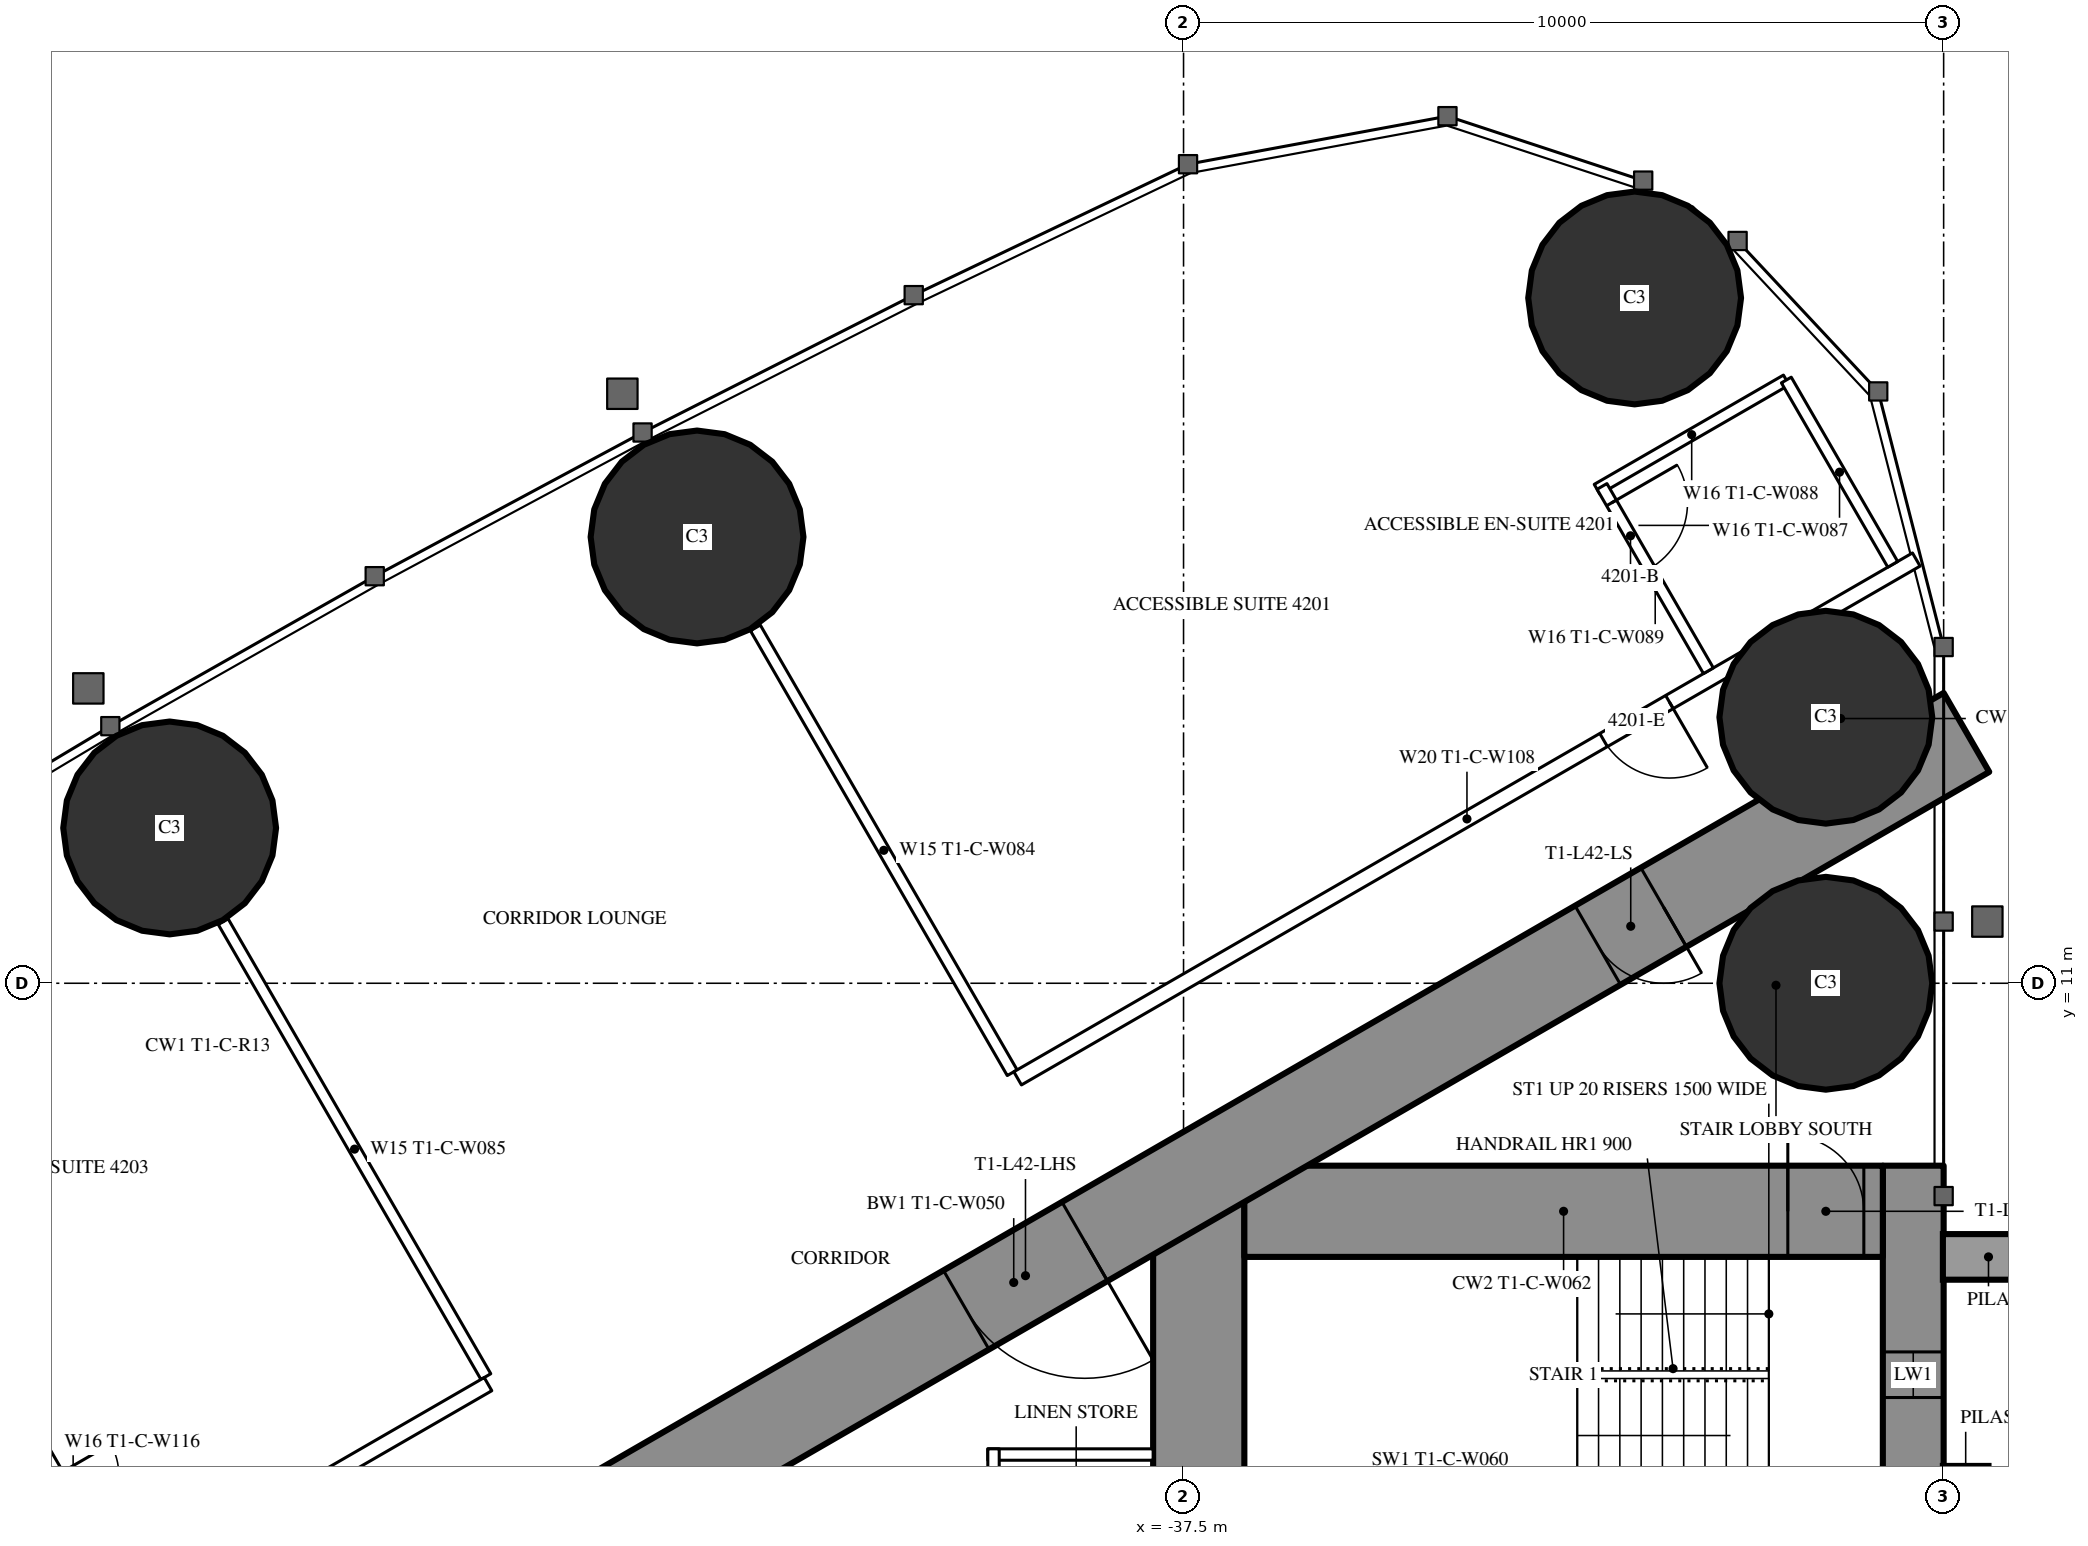
"""IFC4 building model, lengths in metres.
Left out: names, types, materials, properties, quantities, classifications, styles, units other than length and angle.
Written with IfcOpenShell. Run it as: python <this file> out.ifc"""

import sys

from ifc_helpers import new_model, si_unit, direction, frame, frame_2d, origin, origin_2d, place, context, subcontext, project, spatial, rectangle, circle, extrude, element, fill, save


model = new_model("IFC4")
c1 = context("Model", 3, precision=1e-05, world=origin(), true_north=direction((0.0, 1.0)))
c2 = subcontext(c1, "Body", "Model", "MODEL_VIEW")
j1 = project(units=[si_unit("LENGTHUNIT", "METRE"), si_unit("PLANEANGLEUNIT", "RADIAN")], contexts=[c1])
p1 = place(None, origin())
s1 = spatial("IfcSite", under=j1, at=p1, CompositionType="ELEMENT")
p2 = place(p1, origin())
s2 = spatial("IfcBuilding", under=s1, at=p2, CompositionType="ELEMENT")
p3 = place(p2, frame((0.0, 0.0, 159.8)))
s3 = spatial("IfcBuildingStorey", under=s2, at=p3, CompositionType="ELEMENT", Elevation=159.8)
for number, where, z_axis, x_axis in (
    (1, (-31.565, 20.016, 0.0), (0.0, 0.0, 1.0), (1.0, 0.0, 0.0)),
    (2, (-29.05, 11.0, 0.0), (0.0, 0.0, 1.0), (1.0, 0.0, 0.0)),
    (3, (-29.05, 14.5, 0.0), (0.0, 0.0, 1.0), (1.0, 0.0, 0.0)),
    (4, (-43.9, 16.871, 0.0), (0.0, 0.0, 1.0), (1.0, 0.0, 0.0)),
    (5, (-50.839, 13.043, 0.0), (0.0, 0.0, 1.0), (1.0, 0.0, 0.0)),
):
    element("IfcColumn", number, at=place(p3, frame(where, z_axis=z_axis, x_axis=x_axis)), inside=s3, PredefinedType="COLUMN", context=c2, shape_type="SweptSolid", body=[
        extrude(circle(Radius=1.4, at=origin_2d()), origin(), (0.0, 0.0, 1.0), 3.5),
    ])
p4 = place(p3, frame((-27.9, 8.6, 0.0), z_axis=(0.0, 0.0, 1.0), x_axis=(0.0, -1.0, 0.0)))
e6 = element("IfcWall", 6, at=p4, inside=s3, PredefinedType="SHEAR", context=c2, shape_type="SweptSolid", body=[
    extrude(rectangle(XDim=17.2, YDim=0.8, at=frame_2d((8.6, 0.0))), origin(), (0.0, 0.0, 1.0), 3.5),
])
p5 = place(p4, frame((2.45, 0.0, 0.6)))
e7 = element("IfcOpeningElement", 7, at=p5, cuts=e6, PredefinedType="OPENING", context=c2, shape_type="SweptSolid", body=[
    extrude(rectangle(XDim=0.6, YDim=2.1, at=frame_2d((0.3, 1.05))), frame((0.0, 0.41, 0.0), z_axis=(0.0, -1.0, 0.0), x_axis=(1.0, 0.0, 0.0)), (0.0, 0.0, 1.0), 0.82),
])
p6 = place(p4, frame((14.15, 0.0, 0.6)))
e8 = element("IfcOpeningElement", 8, at=p6, cuts=e6, PredefinedType="OPENING", context=c2, shape_type="SweptSolid", body=[
    extrude(rectangle(XDim=0.6, YDim=2.1, at=frame_2d((0.3, 1.05))), frame((0.0, 0.41, 0.0), z_axis=(0.0, -1.0, 0.0), x_axis=(1.0, 0.0, 0.0)), (0.0, 0.0, 1.0), 0.82),
])
p7 = place(p3, frame((-37.3, 8.6, 0.0), z_axis=(0.0, 0.0, 1.0), x_axis=(0.0, -1.0, 0.0)))
e9 = element("IfcWall", 9, at=p7, inside=s3, PredefinedType="SHEAR", context=c2, shape_type="SweptSolid", body=[
    extrude(rectangle(XDim=17.2, YDim=1.2, at=frame_2d((8.6, 0.0))), origin(), (0.0, 0.0, 1.0), 3.5),
])
p8 = place(p7, frame((7.7, 0.0, 0.0)))
e10 = element("IfcOpeningElement", 10, at=p8, cuts=e9, PredefinedType="OPENING", context=c2, shape_type="SweptSolid", body=[
    extrude(rectangle(XDim=1.8, YDim=2.2, at=frame_2d((0.9, 1.1))), frame((0.0, 0.61, 0.0), z_axis=(0.0, -1.0, 0.0), x_axis=(1.0, 0.0, 0.0)), (0.0, 0.0, 1.0), 1.22),
])
p9 = place(p3, frame((-28.3, 8.0, 0.0), z_axis=(0.0, 0.0, 1.0), x_axis=(-1.0, 0.0, 0.0)))
e11 = element("IfcWall", 11, at=p9, inside=s3, PredefinedType="SHEAR", context=c2, shape_type="SweptSolid", body=[
    extrude(rectangle(XDim=8.4, YDim=1.2, at=frame_2d((4.2, 0.0))), origin(), (0.0, 0.0, 1.0), 3.5),
])
p10 = place(p9, frame((0.25, 0.0, 0.0)))
e12 = element("IfcOpeningElement", 12, at=p10, cuts=e11, PredefinedType="OPENING", context=c2, shape_type="SweptSolid", body=[
    extrude(rectangle(XDim=1.0, YDim=2.2, at=frame_2d((0.5, 1.1))), frame((0.0, 0.61, 0.0), z_axis=(0.0, -1.0, 0.0), x_axis=(1.0, 0.0, 0.0)), (0.0, 0.0, 1.0), 1.22),
])
p11 = place(p3, frame((-27.2, 14.3, 0.0), z_axis=(0.0, 0.0, 1.0), x_axis=(-0.866026593062, -0.499997940104, 0.0)))
e13 = element("IfcWall", 13, at=p11, inside=s3, PredefinedType="SHEAR", context=c2, shape_type="SweptSolid", body=[
    extrude(rectangle(XDim=28.946, YDim=1.2, at=frame_2d((14.473, 0.0))), origin(), (0.0, 0.0, 1.0), 3.5),
])
p12 = place(p11, frame((4.6, 0.0, 0.0)))
e14 = element("IfcOpeningElement", 14, at=p12, cuts=e13, PredefinedType="OPENING", context=c2, shape_type="SweptSolid", body=[
    extrude(rectangle(XDim=1.0, YDim=2.2, at=frame_2d((0.5, 1.1))), frame((0.0, 0.61, 0.0), z_axis=(0.0, -1.0, 0.0), x_axis=(1.0, 0.0, 0.0)), (0.0, 0.0, 1.0), 1.22),
])
p13 = place(p11, frame((13.395, 0.0, 0.0)))
e15 = element("IfcOpeningElement", 15, at=p13, cuts=e13, PredefinedType="OPENING", context=c2, shape_type="SweptSolid", body=[
    extrude(rectangle(XDim=1.8, YDim=2.2, at=frame_2d((0.9, 1.1))), frame((0.0, 0.61, 0.0), z_axis=(0.0, -1.0, 0.0), x_axis=(1.0, 0.0, 0.0)), (0.0, 0.0, 1.0), 1.22),
])
p14 = place(p3, frame((-39.754, 9.823, 0.0), z_axis=(0.0, 0.0, 1.0), x_axis=(-0.499997670926, 0.866026748472, 0.0)))
e16 = element("IfcWall", 16, at=p14, inside=s3, PredefinedType="PARTITIONING", context=c2, shape_type="SweptSolid", body=[
    extrude(rectangle(XDim=6.757, YDim=0.15, at=frame_2d((3.379, 0.0))), origin(), (0.0, 0.0, 1.0), 2.3),
])
p15 = place(p3, frame((-46.679, 5.825, 0.0), z_axis=(0.0, 0.0, 1.0), x_axis=(-0.500006839597, 0.866021454905, 0.0)))
e17 = element("IfcWall", 17, at=p15, inside=s3, PredefinedType="PARTITIONING", context=c2, shape_type="SweptSolid", body=[
    extrude(rectangle(XDim=6.911, YDim=0.15, at=frame_2d((3.456, 0.0))), origin(), (0.0, 0.0, 1.0), 2.3),
])
p16 = place(p3, frame((-27.86, 16.575, 0.0), z_axis=(0.0, 0.0, 1.0), x_axis=(-0.866026850238, -0.499997494661, 0.0)))
e18 = element("IfcWall", 18, at=p16, inside=s3, PredefinedType="PARTITIONING", context=c2, shape_type="SweptSolid", body=[
    extrude(rectangle(XDim=13.651, YDim=0.2, at=frame_2d((6.826, 0.0))), origin(), (0.0, 0.0, 1.0), 3.25),
])
p17 = place(p16, frame((3.75, 0.0, 0.0)))
e19 = element("IfcOpeningElement", 19, at=p17, cuts=e18, PredefinedType="OPENING", context=c2, shape_type="SweptSolid", body=[
    extrude(rectangle(XDim=1.0, YDim=2.2, at=frame_2d((0.5, 1.1))), frame((0.0, 0.11, 0.0), z_axis=(0.0, -1.0, 0.0), x_axis=(1.0, 0.0, 0.0)), (0.0, 0.0, 1.0), 0.22),
])
p18 = place(p3, frame((-46.65, 5.726, 0.0), z_axis=(0.0, 0.0, 1.0), x_axis=(-0.866027963864, -0.499995565786, 0.0)))
e20 = element("IfcWall", 20, at=p18, inside=s3, PredefinedType="PARTITIONING", context=c2, shape_type="SweptSolid", body=[
    extrude(rectangle(XDim=11.452, YDim=0.2, at=frame_2d((5.726, 0.0))), origin(), (0.0, 0.0, 1.0), 3.25),
])
p19 = place(p18, frame((4.294, 0.0, 0.0)))
e21 = element("IfcOpeningElement", 21, at=p19, cuts=e20, PredefinedType="OPENING", context=c2, shape_type="SweptSolid", body=[
    extrude(rectangle(XDim=0.95, YDim=2.2, at=frame_2d((0.475, 1.1))), frame((0.0, 0.11, 0.0), z_axis=(0.0, -1.0, 0.0), x_axis=(1.0, 0.0, 0.0)), (0.0, 0.0, 1.0), 0.22),
])
p20 = place(p18, frame((8.344, 0.0, 0.0)))
e22 = element("IfcOpeningElement", 22, at=p20, cuts=e20, PredefinedType="OPENING", context=c2, shape_type="SweptSolid", body=[
    extrude(rectangle(XDim=0.95, YDim=2.2, at=frame_2d((0.475, 1.1))), frame((0.0, 0.11, 0.0), z_axis=(0.0, -1.0, 0.0), x_axis=(1.0, 0.0, 0.0)), (0.0, 0.0, 1.0), 0.22),
])
p21 = place(p3, frame((-29.57, 18.936, 0.0), z_axis=(0.0, 0.0, 1.0), x_axis=(-0.866018712932, -0.500011588718, 0.0)))
e23 = element("IfcWall", 23, at=p21, inside=s3, PredefinedType="PARTITIONING", context=c2, shape_type="SweptSolid", body=[
    extrude(rectangle(XDim=2.875, YDim=0.15, at=frame_2d((1.438, 0.0))), origin(), (0.0, 0.0, 1.0), 3.25),
])
p22 = place(p3, frame((-30.595, 15.111, 0.0), z_axis=(0.0, 0.0, 1.0), x_axis=(-0.49998411664, 0.866034573852, 0.0)))
e24 = element("IfcWall", 24, at=p22, inside=s3, PredefinedType="PARTITIONING", context=c2, shape_type="SweptSolid", body=[
    extrude(rectangle(XDim=2.8, YDim=0.15, at=frame_2d((1.4, 0.0))), origin(), (0.0, 0.0, 1.0), 3.25),
])
p23 = place(p22, frame((1.55, 0.0, 0.0)))
e25 = element("IfcOpeningElement", 25, at=p23, cuts=e24, PredefinedType="OPENING", context=c2, shape_type="SweptSolid", body=[
    extrude(rectangle(XDim=1.0, YDim=2.2, at=frame_2d((0.5, 1.1))), frame((0.0, 0.085, 0.0), z_axis=(0.0, -1.0, 0.0), x_axis=(1.0, 0.0, 0.0)), (0.0, 0.0, 1.0), 0.17),
])
p24 = place(p3, frame((-28.17, 16.511, 0.0), z_axis=(0.0, 0.0, 1.0), x_axis=(-0.49994636267, 0.866056369097, 0.0)))
e26 = element("IfcWall", 26, at=p24, inside=s3, PredefinedType="PARTITIONING", context=c2, shape_type="SweptSolid", body=[
    extrude(rectangle(XDim=2.8, YDim=0.15, at=frame_2d((1.4, 0.0))), origin(), (0.0, 0.0, 1.0), 3.25),
])
p25 = place(p3, frame((-51.459, 3.065, 0.0), z_axis=(0.0, 0.0, 1.0), x_axis=(-0.499936506574, 0.866062058628, 0.0)))
e27 = element("IfcWall", 27, at=p25, inside=s3, PredefinedType="PARTITIONING", context=c2, shape_type="SweptSolid", body=[
    extrude(rectangle(XDim=2.6, YDim=0.15, at=frame_2d((1.3, 0.0))), origin(), (0.0, 0.0, 1.0), 3.25),
])
p26 = place(p25, frame((0.9, 0.0, 0.0)))
e28 = element("IfcOpeningElement", 28, at=p26, cuts=e27, PredefinedType="OPENING", context=c2, shape_type="SweptSolid", body=[
    extrude(rectangle(XDim=0.8, YDim=2.2, at=frame_2d((0.4, 1.1))), frame((0.0, 0.085, 0.0), z_axis=(0.0, -1.0, 0.0), x_axis=(1.0, 0.0, 0.0)), (0.0, 0.0, 1.0), 0.17),
])
p27 = place(p3, frame((-37.9, 4.8, 0.0), z_axis=(0.0, 0.0, 1.0), x_axis=(-1.0, 0.0, 0.0)))
e29 = element("IfcWall", 29, at=p27, inside=s3, PredefinedType="PARTITIONING", context=c2, shape_type="SweptSolid", body=[
    extrude(rectangle(XDim=2.175, YDim=0.15, at=frame_2d((1.087, 0.0))), origin(), (0.0, 0.0, 1.0), 3.25),
])
p28 = place(p3, frame((-40.0, 4.875, 0.0), z_axis=(0.0, 0.0, 1.0), x_axis=(0.0, -1.0, 0.0)))
e30 = element("IfcWall", 30, at=p28, inside=s3, PredefinedType="PARTITIONING", context=c2, shape_type="SweptSolid", body=[
    extrude(rectangle(XDim=1.95, YDim=0.15, at=frame_2d((0.975, 0.0))), origin(), (0.0, 0.0, 1.0), 3.25),
])
p29 = place(p28, frame((0.475, 0.0, 0.0)))
e31 = element("IfcOpeningElement", 31, at=p29, cuts=e30, PredefinedType="OPENING", context=c2, shape_type="SweptSolid", body=[
    extrude(rectangle(XDim=1.0, YDim=2.2, at=frame_2d((0.5, 1.1))), frame((0.0, 0.085, 0.0), z_axis=(0.0, -1.0, 0.0), x_axis=(1.0, 0.0, 0.0)), (0.0, 0.0, 1.0), 0.17),
])
p30 = place(p23, origin())
e32 = element("IfcDoor", 32, at=p30, inside=s3, OperationType="SINGLE_SWING_RIGHT", PredefinedType="DOOR", context=c2, shape_type="SweptSolid", body=[
    extrude(rectangle(XDim=1.0, YDim=2.2, at=frame_2d((0.5, 1.1))), frame((0.0, 0.025, 0.0), z_axis=(0.0, -1.0, 0.0), x_axis=(1.0, 0.0, 0.0)), (0.0, 0.0, 1.0), 0.05),
])
fill(e25, e32)
p31 = place(p17, origin())
e33 = element("IfcDoor", 33, at=p31, inside=s3, OperationType="SINGLE_SWING_LEFT", PredefinedType="DOOR", context=c2, shape_type="SweptSolid", body=[
    extrude(rectangle(XDim=1.0, YDim=2.2, at=frame_2d((0.5, 1.1))), frame((0.0, 0.025, 0.0), z_axis=(0.0, -1.0, 0.0), x_axis=(1.0, 0.0, 0.0)), (0.0, 0.0, 1.0), 0.05),
])
fill(e19, e33)
p32 = place(p12, origin())
e34 = element("IfcDoor", 34, at=p32, inside=s3, OperationType="SINGLE_SWING_LEFT", PredefinedType="DOOR", context=c2, shape_type="SweptSolid", body=[
    extrude(rectangle(XDim=1.0, YDim=2.2, at=frame_2d((0.5, 1.1))), frame((0.0, 0.025, 0.0), z_axis=(0.0, -1.0, 0.0), x_axis=(1.0, 0.0, 0.0)), (0.0, 0.0, 1.0), 0.05),
])
fill(e14, e34)
p33 = place(p13, origin())
e35 = element("IfcDoor", 35, at=p33, inside=s3, OperationType="DOUBLE_DOOR_SINGLE_SWING", PredefinedType="DOOR", context=c2, shape_type="SweptSolid", body=[
    extrude(rectangle(XDim=1.8, YDim=2.2, at=frame_2d((0.9, 1.1))), frame((0.0, 0.025, 0.0), z_axis=(0.0, -1.0, 0.0), x_axis=(1.0, 0.0, 0.0)), (0.0, 0.0, 1.0), 0.05),
])
fill(e15, e35)
p34 = place(p10, origin())
e36 = element("IfcDoor", 36, at=p34, inside=s3, OperationType="SINGLE_SWING_RIGHT", PredefinedType="DOOR", context=c2, shape_type="SweptSolid", body=[
    extrude(rectangle(XDim=1.0, YDim=2.2, at=frame_2d((0.5, 1.1))), frame((0.0, 0.025, 0.0), z_axis=(0.0, -1.0, 0.0), x_axis=(1.0, 0.0, 0.0)), (0.0, 0.0, 1.0), 0.05),
])
fill(e12, e36)
p35 = place(p5, origin())
e37 = element("IfcWindow", 37, at=p35, inside=s3, PartitioningType="SINGLE_PANEL", PredefinedType="WINDOW", context=c2, shape_type="SweptSolid", body=[
    extrude(rectangle(XDim=0.6, YDim=2.1, at=frame_2d((0.3, 1.05))), frame((0.0, 0.03, 0.0), z_axis=(0.0, -1.0, 0.0), x_axis=(1.0, 0.0, 0.0)), (0.0, 0.0, 1.0), 0.06),
])
fill(e7, e37)
save(model, sys.argv[1])
